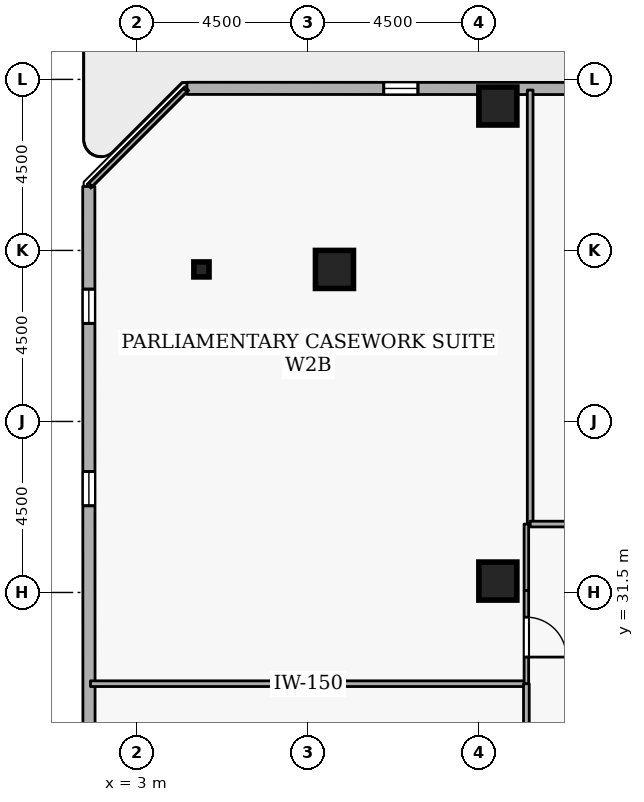
"""IFC4 building model, lengths in metres.
Left out: names, types, materials, properties, quantities, classifications, styles, units other than length and angle.
Written with IfcOpenShell. Run it as: python <this file> out.ifc"""

import sys

from ifc_helpers import new_model, si_unit, direction, frame, frame_2d, origin, origin_2d, place, context, subcontext, project, spatial, rectangle, i_section, extrude, element, fill, save


model = new_model("IFC4")
c1 = context("Model", 3, precision=1e-05, world=origin(), true_north=direction((0.0, 1.0)))
c2 = subcontext(c1, "Body", "Model", "MODEL_VIEW")
j1 = project(units=[si_unit("LENGTHUNIT", "METRE"), si_unit("PLANEANGLEUNIT", "RADIAN")], contexts=[c1])
p1 = place(None, origin())
s1 = spatial("IfcSite", under=j1, at=p1, CompositionType="ELEMENT")
p2 = place(p1, origin())
s2 = spatial("IfcBuilding", under=s1, at=p2, CompositionType="ELEMENT")
p3 = place(p2, frame((0.0, 0.0, 229.5)))
s3 = spatial("IfcBuildingStorey", under=s2, at=p3, CompositionType="ELEMENT", Elevation=229.5)
for number, where, z_axis, x_axis in (
    (1, (12.5, 44.3, 0.0), (0.0, 0.0, 1.0), (1.0, 0.0, 0.0)),
    (2, (8.2, 40.0, 0.0), (0.0, 0.0, 1.0), (1.0, 0.0, 0.0)),
    (3, (12.5, 31.8, 0.0), (0.0, 0.0, 1.0), (1.0, 0.0, 0.0)),
):
    element("IfcColumn", number, at=place(p3, frame(where, z_axis=z_axis, x_axis=x_axis)), inside=s3, PredefinedType="COLUMN", context=c2, shape_type="SweptSolid", body=[
        extrude(rectangle(XDim=1.0, YDim=1.0, at=origin_2d()), origin(), (0.0, 0.0, 1.0), 3.6),
    ])
p4 = place(p3, frame((4.7, 40.0, 0.0), z_axis=(0.0, 0.0, 1.0), x_axis=(1.0, 0.0, 0.0)))
e4 = element("IfcColumn", 4, at=p4, inside=s3, PredefinedType="COLUMN", context=c2, shape_type="SweptSolid", body=[
    extrude(i_section(OverallWidth=0.399, OverallDepth=0.394, WebThickness=0.023, FlangeThickness=0.037, FilletRadius=0.015, at=origin_2d()), origin(), (0.0, 0.0, 1.0), 3.6),
])
p5 = place(p3, frame((37.096, 44.753, 0.0), z_axis=(0.0, 0.0, 1.0), x_axis=(-0.999999933399, 0.000364968916, 0.0)))
e5 = element("IfcWall", 5, at=p5, inside=s3, PredefinedType="STANDARD", context=c2, shape_type="SweptSolid", body=[
    extrude(rectangle(XDim=32.778, YDim=0.32, at=frame_2d((16.389, 0.0))), origin(), (0.0, 0.0, 1.0), 2.7),
])
p6 = place(p5, frame((19.914, 0.0, 0.0)))
e6 = element("IfcOpeningElement", 6, at=p6, cuts=e5, PredefinedType="OPENING", context=c2, shape_type="SweptSolid", body=[
    extrude(rectangle(XDim=1.15, YDim=2.1, at=frame_2d((0.575, 1.05))), frame((0.0, 0.17, 0.0), z_axis=(0.0, -1.0, 0.0), x_axis=(1.0, 0.0, 0.0)), (0.0, 0.0, 1.0), 0.34),
])
p7 = place(p5, frame((2.7, 0.0, 0.72)))
e7 = element("IfcOpeningElement", 7, at=p7, cuts=e5, PredefinedType="OPENING", context=c2, shape_type="SweptSolid", body=[
    extrude(rectangle(XDim=0.9, YDim=1.75, at=frame_2d((0.45, 0.875))), frame((0.0, 0.17, 0.0), z_axis=(0.0, -1.0, 0.0), x_axis=(1.0, 0.0, 0.0)), (0.0, 0.0, 1.0), 0.34),
])
p8 = place(p5, frame((7.5, 0.0, 0.72)))
e8 = element("IfcOpeningElement", 8, at=p8, cuts=e5, PredefinedType="OPENING", context=c2, shape_type="SweptSolid", body=[
    extrude(rectangle(XDim=0.9, YDim=1.75, at=frame_2d((0.45, 0.875))), frame((0.0, 0.17, 0.0), z_axis=(0.0, -1.0, 0.0), x_axis=(1.0, 0.0, 0.0)), (0.0, 0.0, 1.0), 0.34),
])
p9 = place(p5, frame((17.1, 0.0, 0.72)))
e9 = element("IfcOpeningElement", 9, at=p9, cuts=e5, PredefinedType="OPENING", context=c2, shape_type="SweptSolid", body=[
    extrude(rectangle(XDim=0.9, YDim=1.75, at=frame_2d((0.45, 0.875))), frame((0.0, 0.17, 0.0), z_axis=(0.0, -1.0, 0.0), x_axis=(1.0, 0.0, 0.0)), (0.0, 0.0, 1.0), 0.34),
])
p10 = place(p5, frame((21.9, 0.0, 0.72)))
e10 = element("IfcOpeningElement", 10, at=p10, cuts=e5, PredefinedType="OPENING", context=c2, shape_type="SweptSolid", body=[
    extrude(rectangle(XDim=0.9, YDim=1.75, at=frame_2d((0.45, 0.875))), frame((0.0, 0.17, 0.0), z_axis=(0.0, -1.0, 0.0), x_axis=(1.0, 0.0, 0.0)), (0.0, 0.0, 1.0), 0.34),
])
p11 = place(p5, frame((26.7, 0.0, 0.72)))
e11 = element("IfcOpeningElement", 11, at=p11, cuts=e5, PredefinedType="OPENING", context=c2, shape_type="SweptSolid", body=[
    extrude(rectangle(XDim=0.9, YDim=1.75, at=frame_2d((0.45, 0.875))), frame((0.0, 0.17, 0.0), z_axis=(0.0, -1.0, 0.0), x_axis=(1.0, 0.0, 0.0)), (0.0, 0.0, 1.0), 0.34),
])
p12 = place(p3, frame((1.735, 42.181, 0.0), z_axis=(0.0, 0.0, 1.0), x_axis=(0.000364968916, -0.999999933399, 0.0)))
e12 = element("IfcWall", 12, at=p12, inside=s3, PredefinedType="STANDARD", context=c2, shape_type="SweptSolid", body=[
    extrude(rectangle(XDim=32.778, YDim=0.32, at=frame_2d((16.389, 0.0))), origin(), (0.0, 0.0, 1.0), 2.7),
])
p13 = place(p12, frame((2.7, 0.0, 0.72)))
e13 = element("IfcOpeningElement", 13, at=p13, cuts=e12, PredefinedType="OPENING", context=c2, shape_type="SweptSolid", body=[
    extrude(rectangle(XDim=0.9, YDim=1.75, at=frame_2d((0.45, 0.875))), frame((0.0, 0.17, 0.0), z_axis=(0.0, -1.0, 0.0), x_axis=(1.0, 0.0, 0.0)), (0.0, 0.0, 1.0), 0.34),
])
p14 = place(p12, frame((7.5, 0.0, 0.72)))
e14 = element("IfcOpeningElement", 14, at=p14, cuts=e12, PredefinedType="OPENING", context=c2, shape_type="SweptSolid", body=[
    extrude(rectangle(XDim=0.9, YDim=1.75, at=frame_2d((0.45, 0.875))), frame((0.0, 0.17, 0.0), z_axis=(0.0, -1.0, 0.0), x_axis=(1.0, 0.0, 0.0)), (0.0, 0.0, 1.0), 0.34),
])
p15 = place(p12, frame((21.9, 0.0, 0.72)))
e15 = element("IfcOpeningElement", 15, at=p15, cuts=e12, PredefinedType="OPENING", context=c2, shape_type="SweptSolid", body=[
    extrude(rectangle(XDim=0.9, YDim=1.75, at=frame_2d((0.45, 0.875))), frame((0.0, 0.17, 0.0), z_axis=(0.0, -1.0, 0.0), x_axis=(1.0, 0.0, 0.0)), (0.0, 0.0, 1.0), 0.34),
])
p16 = place(p12, frame((26.7, 0.0, 0.72)))
e16 = element("IfcOpeningElement", 16, at=p16, cuts=e12, PredefinedType="OPENING", context=c2, shape_type="SweptSolid", body=[
    extrude(rectangle(XDim=0.9, YDim=1.75, at=frame_2d((0.45, 0.875))), frame((0.0, 0.17, 0.0), z_axis=(0.0, -1.0, 0.0), x_axis=(1.0, 0.0, 0.0)), (0.0, 0.0, 1.0), 0.34),
])
p17 = place(p3, frame((13.35, 33.3, 0.0), z_axis=(0.0, 0.0, 1.0), x_axis=(0.0, 1.0, 0.0)))
e17 = element("IfcWall", 17, at=p17, inside=s3, PredefinedType="PARTITIONING", context=c2, shape_type="SweptSolid", body=[
    extrude(rectangle(XDim=11.42, YDim=0.15, at=frame_2d((5.71, 0.0))), origin(), (0.0, 0.0, 1.0), 3.3),
])
p18 = place(p3, frame((17.7, 33.3, 0.0), z_axis=(0.0, 0.0, 1.0), x_axis=(-1.0, 0.0, 0.0)))
e18 = element("IfcWall", 18, at=p18, inside=s3, PredefinedType="PARTITIONING", context=c2, shape_type="SweptSolid", body=[
    extrude(rectangle(XDim=4.35, YDim=0.15, at=frame_2d((2.175, 0.0))), origin(), (0.0, 0.0, 1.0), 3.3),
])
p19 = place(p18, frame((1.525, 0.0, 0.0)))
e19 = element("IfcOpeningElement", 19, at=p19, cuts=e18, PredefinedType="OPENING", context=c2, shape_type="SweptSolid", body=[
    extrude(rectangle(XDim=1.3, YDim=2.12, at=frame_2d((0.65, 1.06))), frame((0.0, 0.085, 0.0), z_axis=(0.0, -1.0, 0.0), x_axis=(1.0, 0.0, 0.0)), (0.0, 0.0, 1.0), 0.17),
])
p20 = place(p3, frame((1.78, 29.1, 0.0), z_axis=(0.0, 0.0, 1.0), x_axis=(1.0, 0.0, 0.0)))
e20 = element("IfcWall", 20, at=p20, inside=s3, PredefinedType="PARTITIONING", context=c2, shape_type="SweptSolid", body=[
    extrude(rectangle(XDim=11.47, YDim=0.15, at=frame_2d((5.735, 0.0))), origin(), (0.0, 0.0, 1.0), 3.3),
])
p21 = place(p3, frame((13.25, 29.1, 0.0), z_axis=(0.0, 0.0, 1.0), x_axis=(0.0, -1.0, 0.0)))
e21 = element("IfcWall", 21, at=p21, inside=s3, PredefinedType="PARTITIONING", context=c2, shape_type="SweptSolid", body=[
    extrude(rectangle(XDim=4.2, YDim=0.15, at=frame_2d((2.1, 0.0))), origin(), (0.0, 0.0, 1.0), 3.3),
])
p22 = place(p21, frame((1.45, 0.0, 0.0)))
e22 = element("IfcOpeningElement", 22, at=p22, cuts=e21, PredefinedType="OPENING", context=c2, shape_type="SweptSolid", body=[
    extrude(rectangle(XDim=1.3, YDim=2.12, at=frame_2d((0.65, 1.06))), frame((0.0, 0.085, 0.0), z_axis=(0.0, -1.0, 0.0), x_axis=(1.0, 0.0, 0.0)), (0.0, 0.0, 1.0), 0.17),
])
p23 = place(p3, frame((1.78, 42.225, 0.0), z_axis=(0.0, 0.0, 1.0), x_axis=(0.707106781187, 0.707106781187, 0.0)))
e23 = element("IfcWall", 23, at=p23, inside=s3, PredefinedType="PARTITIONING", context=c2, shape_type="SweptSolid", body=[
    extrude(rectangle(XDim=3.528, YDim=0.12, at=frame_2d((1.764, 0.0))), origin(), (0.0, 0.0, 1.0), 3.3),
])
p24 = place(p3, frame((13.25, 33.3, 0.0), z_axis=(0.0, 0.0, 1.0), x_axis=(0.0, -1.0, 0.0)))
e24 = element("IfcWall", 24, at=p24, inside=s3, PredefinedType="PARTITIONING", context=c2, shape_type="SweptSolid", body=[
    extrude(rectangle(XDim=1.75, YDim=0.12, at=frame_2d((0.875, 0.0))), origin(), (0.0, 0.0, 1.0), 3.3),
])
p25 = place(p3, frame((13.25, 31.55, 0.0), z_axis=(0.0, 0.0, 1.0), x_axis=(0.0, -1.0, 0.0)))
e25 = element("IfcWall", 25, at=p25, inside=s3, PredefinedType="PARTITIONING", context=c2, shape_type="SweptSolid", body=[
    extrude(rectangle(XDim=2.45, YDim=0.12, at=frame_2d((1.225, 0.0))), origin(), (0.0, 0.0, 1.0), 3.3),
])
p26 = place(p25, frame((0.7, 0.0, 0.0)))
e26 = element("IfcOpeningElement", 26, at=p26, cuts=e25, PredefinedType="OPENING", context=c2, shape_type="SweptSolid", body=[
    extrude(rectangle(XDim=1.05, YDim=2.1, at=frame_2d((0.525, 1.05))), frame((0.0, 0.07, 0.0), z_axis=(0.0, -1.0, 0.0), x_axis=(1.0, 0.0, 0.0)), (0.0, 0.0, 1.0), 0.14),
])
p27 = place(p11, origin())
e27 = element("IfcWindow", 27, at=p27, inside=s3, PartitioningType="SINGLE_PANEL", PredefinedType="WINDOW", context=c2, shape_type="SweptSolid", body=[
    extrude(rectangle(XDim=0.9, YDim=1.75, at=frame_2d((0.45, 0.875))), frame((0.0, 0.03, 0.0), z_axis=(0.0, -1.0, 0.0), x_axis=(1.0, 0.0, 0.0)), (0.0, 0.0, 1.0), 0.06),
])
fill(e11, e27)
p28 = place(p13, origin())
e28 = element("IfcWindow", 28, at=p28, inside=s3, PartitioningType="SINGLE_PANEL", PredefinedType="WINDOW", context=c2, shape_type="SweptSolid", body=[
    extrude(rectangle(XDim=0.9, YDim=1.75, at=frame_2d((0.45, 0.875))), frame((0.0, 0.03, 0.0), z_axis=(0.0, -1.0, 0.0), x_axis=(1.0, 0.0, 0.0)), (0.0, 0.0, 1.0), 0.06),
])
fill(e13, e28)
p29 = place(p14, origin())
e29 = element("IfcWindow", 29, at=p29, inside=s3, PartitioningType="SINGLE_PANEL", PredefinedType="WINDOW", context=c2, shape_type="SweptSolid", body=[
    extrude(rectangle(XDim=0.9, YDim=1.75, at=frame_2d((0.45, 0.875))), frame((0.0, 0.03, 0.0), z_axis=(0.0, -1.0, 0.0), x_axis=(1.0, 0.0, 0.0)), (0.0, 0.0, 1.0), 0.06),
])
fill(e14, e29)
p30 = place(p26, origin())
e30 = element("IfcDoor", 30, at=p30, inside=s3, OperationType="SINGLE_SWING_RIGHT", PredefinedType="DOOR", context=c2, shape_type="SweptSolid", body=[
    extrude(rectangle(XDim=1.05, YDim=2.1, at=frame_2d((0.525, 1.05))), frame((0.0, 0.025, 0.0), z_axis=(0.0, -1.0, 0.0), x_axis=(1.0, 0.0, 0.0)), (0.0, 0.0, 1.0), 0.05),
])
fill(e26, e30)
save(model, sys.argv[1])
